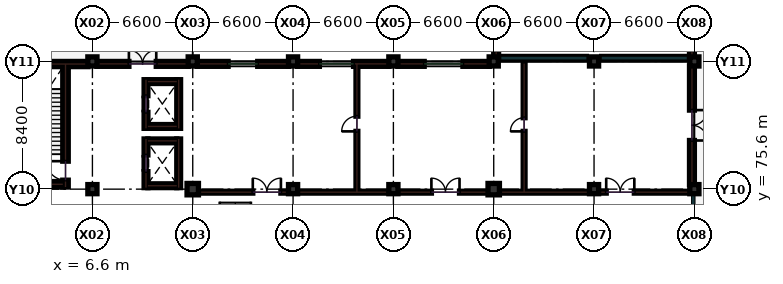
"""IFC4 building model, lengths in metres.
Left out: names, types, materials, properties, quantities, classifications, styles, units other than length and angle.
Written with IfcOpenShell. Run it as: python <this file> out.ifc"""

import sys

from ifc_helpers import new_model, si_unit, direction, frame, frame_2d, origin, origin_2d, place, context, subcontext, project, spatial, rectangle, circle, extrude, element, fill, save


model = new_model("IFC4")
c1 = context("Model", 3, precision=1e-05, world=origin(), true_north=direction((0.0, 1.0)))
c2 = subcontext(c1, "Body", "Model", "MODEL_VIEW")
j1 = project(units=[si_unit("LENGTHUNIT", "METRE"), si_unit("PLANEANGLEUNIT", "RADIAN")], contexts=[c1])
p1 = place(None, origin())
s1 = spatial("IfcSite", under=j1, at=p1, CompositionType="ELEMENT")
p2 = place(p1, origin())
s2 = spatial("IfcBuilding", under=s1, at=p2, CompositionType="ELEMENT")
p3 = place(p2, origin())
s3 = spatial("IfcBuildingStorey", under=s2, at=p3, CompositionType="ELEMENT", Elevation=0.0)
for number, where, z_axis, x_axis in (
    (1, (6.6, 75.6, 0.0), (0.0, 0.0, 1.0), (1.0, 0.0, 0.0)),
    (2, (6.6, 84.0, 0.0), (0.0, 0.0, 1.0), (1.0, 0.0, 0.0)),
):
    element("IfcColumn", number, at=place(p3, frame(where, z_axis=z_axis, x_axis=x_axis)), inside=s3, PredefinedType="COLUMN", context=c2, shape_type="SweptSolid", body=[
        extrude(rectangle(XDim=0.6, YDim=0.6, at=origin_2d()), origin(), (0.0, 0.0, 1.0), 5.4),
    ])
p4 = place(p3, frame((13.2, 75.6, 0.0), z_axis=(0.0, 0.0, 1.0), x_axis=(1.0, 0.0, 0.0)))
e3 = element("IfcColumn", 3, at=p4, inside=s3, PredefinedType="COLUMN", context=c2, shape_type="SweptSolid", body=[
    extrude(circle(Radius=0.375, at=origin_2d()), origin(), (0.0, 0.0, 1.0), 5.4),
])
for number, where, z_axis, x_axis in (
    (4, (13.2, 84.0, 0.0), (0.0, 0.0, 1.0), (1.0, 0.0, 0.0)),
    (5, (19.8, 75.6, 0.0), (0.0, 0.0, 1.0), (1.0, 0.0, 0.0)),
    (6, (19.8, 84.0, 0.0), (0.0, 0.0, 1.0), (1.0, 0.0, 0.0)),
    (7, (26.4, 75.6, 0.0), (0.0, 0.0, 1.0), (1.0, 0.0, 0.0)),
    (8, (26.4, 84.0, 0.0), (0.0, 0.0, 1.0), (1.0, 0.0, 0.0)),
):
    element("IfcColumn", number, at=place(p3, frame(where, z_axis=z_axis, x_axis=x_axis)), inside=s3, PredefinedType="COLUMN", context=c2, shape_type="SweptSolid", body=[
        extrude(rectangle(XDim=0.6, YDim=0.6, at=origin_2d()), origin(), (0.0, 0.0, 1.0), 5.4),
    ])
p5 = place(p3, frame((33.0, 75.6, 0.0), z_axis=(0.0, 0.0, 1.0), x_axis=(1.0, 0.0, 0.0)))
e9 = element("IfcColumn", 9, at=p5, inside=s3, PredefinedType="COLUMN", context=c2, shape_type="SweptSolid", body=[
    extrude(circle(Radius=0.375, at=origin_2d()), origin(), (0.0, 0.0, 1.0), 5.4),
])
for number, where, z_axis, x_axis in (
    (10, (33.0, 84.0, 0.0), (0.0, 0.0, 1.0), (1.0, 0.0, 0.0)),
    (11, (39.6, 75.6, 0.0), (0.0, 0.0, 1.0), (1.0, 0.0, 0.0)),
    (12, (39.6, 84.0, 0.0), (0.0, 0.0, 1.0), (1.0, 0.0, 0.0)),
    (13, (46.2, 75.6, 0.0), (0.0, 0.0, 1.0), (1.0, 0.0, 0.0)),
    (14, (46.2, 84.0, 0.0), (0.0, 0.0, 1.0), (1.0, 0.0, 0.0)),
):
    element("IfcColumn", number, at=place(p3, frame(where, z_axis=z_axis, x_axis=x_axis)), inside=s3, PredefinedType="COLUMN", context=c2, shape_type="SweptSolid", body=[
        extrude(rectangle(XDim=0.6, YDim=0.6, at=origin_2d()), origin(), (0.0, 0.0, 1.0), 5.4),
    ])
p6 = place(p3, frame((12.9, 75.4, 0.0), z_axis=(0.0, 0.0, 1.0), x_axis=(1.0, 0.0, 0.0)))
e15 = element("IfcWall", 15, at=p6, inside=s3, PredefinedType="PARTITIONING", context=c2, shape_type="SweptSolid", body=[
    extrude(rectangle(XDim=6.45, YDim=0.12, at=frame_2d((3.225, 0.0))), origin(), (0.0, 0.0, 1.0), 4.235),
])
p7 = place(p6, frame((4.25, 0.0, 0.0)))
e16 = element("IfcOpeningElement", 16, at=p7, cuts=e15, PredefinedType="OPENING", context=c2, shape_type="SweptSolid", body=[
    extrude(rectangle(XDim=1.85, YDim=2.25, at=frame_2d((0.925, 1.125))), frame((0.0, 0.07, 0.0), z_axis=(0.0, -1.0, 0.0), x_axis=(1.0, 0.0, 0.0)), (0.0, 0.0, 1.0), 0.14),
])
p8 = place(p3, frame((20.25, 75.4, 0.0), z_axis=(0.0, 0.0, 1.0), x_axis=(1.0, 0.0, 0.0)))
e17 = element("IfcWall", 17, at=p8, inside=s3, PredefinedType="PARTITIONING", context=c2, shape_type="SweptSolid", body=[
    extrude(rectangle(XDim=5.7, YDim=0.12, at=frame_2d((2.85, 0.0))), origin(), (0.0, 0.0, 1.0), 4.235),
])
p9 = place(p3, frame((26.85, 75.4, 0.0), z_axis=(0.0, 0.0, 1.0), x_axis=(1.0, 0.0, 0.0)))
e18 = element("IfcWall", 18, at=p9, inside=s3, PredefinedType="PARTITIONING", context=c2, shape_type="SweptSolid", body=[
    extrude(rectangle(XDim=5.7, YDim=0.12, at=frame_2d((2.85, 0.0))), origin(), (0.0, 0.0, 1.0), 4.235),
])
p10 = place(p9, frame((2.05, 0.0, 0.0)))
e19 = element("IfcOpeningElement", 19, at=p10, cuts=e18, PredefinedType="OPENING", context=c2, shape_type="SweptSolid", body=[
    extrude(rectangle(XDim=1.85, YDim=2.25, at=frame_2d((0.925, 1.125))), frame((0.0, 0.07, 0.0), z_axis=(0.0, -1.0, 0.0), x_axis=(1.0, 0.0, 0.0)), (0.0, 0.0, 1.0), 0.14),
])
p11 = place(p3, frame((33.45, 75.4, 0.0), z_axis=(0.0, 0.0, 1.0), x_axis=(1.0, 0.0, 0.0)))
e20 = element("IfcWall", 20, at=p11, inside=s3, PredefinedType="PARTITIONING", context=c2, shape_type="SweptSolid", body=[
    extrude(rectangle(XDim=5.7, YDim=0.12, at=frame_2d((2.85, 0.0))), origin(), (0.0, 0.0, 1.0), 4.235),
])
p12 = place(p3, frame((40.05, 75.4, 0.0), z_axis=(0.0, 0.0, 1.0), x_axis=(1.0, 0.0, 0.0)))
e21 = element("IfcWall", 21, at=p12, inside=s3, PredefinedType="PARTITIONING", context=c2, shape_type="SweptSolid", body=[
    extrude(rectangle(XDim=5.9, YDim=0.12, at=frame_2d((2.95, 0.0))), origin(), (0.0, 0.0, 1.0), 4.235),
])
p13 = place(p12, frame((0.35, 0.0, 0.0)))
e22 = element("IfcOpeningElement", 22, at=p13, cuts=e21, PredefinedType="OPENING", context=c2, shape_type="SweptSolid", body=[
    extrude(rectangle(XDim=1.85, YDim=2.25, at=frame_2d((0.925, 1.125))), frame((0.0, 0.07, 0.0), z_axis=(0.0, -1.0, 0.0), x_axis=(1.0, 0.0, 0.0)), (0.0, 0.0, 1.0), 0.14),
])
p14 = place(p3, frame((24.0, 75.4, 0.0), z_axis=(0.0, 0.0, 1.0), x_axis=(0.0, 1.0, 0.0)))
e23 = element("IfcWall", 23, at=p14, inside=s3, PredefinedType="PARTITIONING", context=c2, shape_type="SweptSolid", body=[
    extrude(rectangle(XDim=8.46, YDim=0.12, at=frame_2d((4.23, 0.0))), origin(), (0.0, 0.0, 1.0), 4.25),
])
p15 = place(p14, frame((4.0, 0.0, 0.0)))
e24 = element("IfcOpeningElement", 24, at=p15, cuts=e23, PredefinedType="OPENING", context=c2, shape_type="SweptSolid", body=[
    extrude(rectangle(XDim=1.0, YDim=2.2, at=frame_2d((0.5, 1.1))), frame((0.0, 0.07, 0.0), z_axis=(0.0, -1.0, 0.0), x_axis=(1.0, 0.0, 0.0)), (0.0, 0.0, 1.0), 0.14),
])
p16 = place(p3, frame((35.0, 75.4, 0.0), z_axis=(0.0, 0.0, 1.0), x_axis=(0.0, 1.0, 0.0)))
e25 = element("IfcWall", 25, at=p16, inside=s3, PredefinedType="PARTITIONING", context=c2, shape_type="SweptSolid", body=[
    extrude(rectangle(XDim=8.46, YDim=0.12, at=frame_2d((4.23, 0.0))), origin(), (0.0, 0.0, 1.0), 4.25),
])
p17 = place(p16, frame((4.0, 0.0, 0.0)))
e26 = element("IfcOpeningElement", 26, at=p17, cuts=e25, PredefinedType="OPENING", context=c2, shape_type="SweptSolid", body=[
    extrude(rectangle(XDim=0.9, YDim=2.1, at=frame_2d((0.45, 1.05))), frame((0.0, 0.07, 0.0), z_axis=(0.0, -1.0, 0.0), x_axis=(1.0, 0.0, 0.0)), (0.0, 0.0, 1.0), 0.14),
])
p18 = place(p3, frame((6.305, 83.83, 0.0), z_axis=(0.0, 0.0, 1.0), x_axis=(-1.0, 0.0, 0.0)))
e27 = element("IfcWall", 27, at=p18, inside=s3, PredefinedType="SHEAR", context=c2, shape_type="SweptSolid", body=[
    extrude(rectangle(XDim=6.01, YDim=0.34, at=frame_2d((3.005, 0.0))), origin(), (0.0, 0.0, 1.0), 5.1),
])
p19 = place(p3, frame((12.905, 83.84, 0.0), z_axis=(0.0, 0.0, 1.0), x_axis=(-1.0, 0.0, 0.0)))
e28 = element("IfcWall", 28, at=p19, inside=s3, PredefinedType="SOLIDWALL", context=c2, shape_type="SweptSolid", body=[
    extrude(rectangle(XDim=6.01, YDim=0.32, at=frame_2d((3.005, 0.0))), origin(), (0.0, 0.0, 1.0), 4.385),
])
p20 = place(p19, frame((2.105, 0.0, 0.0)))
e29 = element("IfcOpeningElement", 29, at=p20, cuts=e28, PredefinedType="OPENING", context=c2, shape_type="SweptSolid", body=[
    extrude(rectangle(XDim=1.8, YDim=2.2, at=frame_2d((0.9, 1.1))), frame((0.0, 0.17, 0.0), z_axis=(0.0, -1.0, 0.0), x_axis=(1.0, 0.0, 0.0)), (0.0, 0.0, 1.0), 0.34),
])
p21 = place(p3, frame((19.505, 83.84, 0.0), z_axis=(0.0, 0.0, 1.0), x_axis=(-1.0, 0.0, 0.0)))
e30 = element("IfcWall", 30, at=p21, inside=s3, PredefinedType="SOLIDWALL", context=c2, shape_type="SweptSolid", body=[
    extrude(rectangle(XDim=6.01, YDim=0.32, at=frame_2d((3.005, 0.0))), origin(), (0.0, 0.0, 1.0), 4.385),
])
p22 = place(p21, frame((2.03, 0.0, 0.95)))
e31 = element("IfcOpeningElement", 31, at=p22, cuts=e30, PredefinedType="OPENING", context=c2, shape_type="SweptSolid", body=[
    extrude(rectangle(XDim=1.95, YDim=1.55, at=frame_2d((0.975, 0.775))), frame((0.0, 0.17, 0.0), z_axis=(0.0, -1.0, 0.0), x_axis=(1.0, 0.0, 0.0)), (0.0, 0.0, 1.0), 0.34),
])
p23 = place(p3, frame((26.105, 83.84, 0.0), z_axis=(0.0, 0.0, 1.0), x_axis=(-1.0, 0.0, 0.0)))
e32 = element("IfcWall", 32, at=p23, inside=s3, PredefinedType="SOLIDWALL", context=c2, shape_type="SweptSolid", body=[
    extrude(rectangle(XDim=6.01, YDim=0.32, at=frame_2d((3.005, 0.0))), origin(), (0.0, 0.0, 1.0), 4.385),
])
p24 = place(p23, frame((2.325, 0.0, 0.95)))
e33 = element("IfcOpeningElement", 33, at=p24, cuts=e32, PredefinedType="OPENING", context=c2, shape_type="SweptSolid", body=[
    extrude(rectangle(XDim=2.25, YDim=1.55, at=frame_2d((1.125, 0.775))), frame((0.0, 0.17, 0.0), z_axis=(0.0, -1.0, 0.0), x_axis=(1.0, 0.0, 0.0)), (0.0, 0.0, 1.0), 0.34),
])
p25 = place(p3, frame((32.705, 83.84, 0.0), z_axis=(0.0, 0.0, 1.0), x_axis=(-1.0, 0.0, 0.0)))
e34 = element("IfcWall", 34, at=p25, inside=s3, PredefinedType="SOLIDWALL", context=c2, shape_type="SweptSolid", body=[
    extrude(rectangle(XDim=6.01, YDim=0.32, at=frame_2d((3.005, 0.0))), origin(), (0.0, 0.0, 1.0), 4.385),
])
p26 = place(p25, frame((1.73, 0.0, 0.95)))
e35 = element("IfcOpeningElement", 35, at=p26, cuts=e34, PredefinedType="OPENING", context=c2, shape_type="SweptSolid", body=[
    extrude(rectangle(XDim=2.55, YDim=1.65, at=frame_2d((1.275, 0.825))), frame((0.0, 0.17, 0.0), z_axis=(0.0, -1.0, 0.0), x_axis=(1.0, 0.0, 0.0)), (0.0, 0.0, 1.0), 0.34),
])
p27 = place(p3, frame((33.16, 92.105, 0.0), z_axis=(0.0, 0.0, 1.0), x_axis=(0.0, -1.0, 0.0)))
e36 = element("IfcWall", 36, at=p27, inside=s3, PredefinedType="SOLIDWALL", context=c2, shape_type="SweptSolid", body=[
    extrude(rectangle(XDim=7.81, YDim=0.32, at=frame_2d((3.905, 0.0))), origin(), (0.0, 0.0, 1.0), 4.335),
])
p28 = place(p27, frame((3.005, 0.0, 0.95)))
e37 = element("IfcOpeningElement", 37, at=p28, cuts=e36, PredefinedType="OPENING", context=c2, shape_type="SweptSolid", body=[
    extrude(rectangle(XDim=1.8, YDim=1.6, at=frame_2d((0.9, 0.8))), frame((0.0, 0.17, 0.0), z_axis=(0.0, -1.0, 0.0), x_axis=(1.0, 0.0, 0.0)), (0.0, 0.0, 1.0), 0.34),
])
p29 = place(p3, frame((46.04, 75.895, 0.0), z_axis=(0.0, 0.0, 1.0), x_axis=(0.0, 1.0, 0.0)))
e38 = element("IfcWall", 38, at=p29, inside=s3, PredefinedType="SOLIDWALL", context=c2, shape_type="SweptSolid", body=[
    extrude(rectangle(XDim=7.81, YDim=0.32, at=frame_2d((3.905, 0.0))), origin(), (0.0, 0.0, 1.0), 4.335),
])
p30 = place(p29, frame((2.905, 0.0, 0.0)))
e39 = element("IfcOpeningElement", 39, at=p30, cuts=e38, PredefinedType="OPENING", context=c2, shape_type="SweptSolid", body=[
    extrude(rectangle(XDim=2.0, YDim=2.4, at=frame_2d((1.0, 1.2))), frame((0.0, 0.17, 0.0), z_axis=(0.0, -1.0, 0.0), x_axis=(1.0, 0.0, 0.0)), (0.0, 0.0, 1.0), 0.34),
])
p31 = place(p3, frame((46.04, 84.295, 0.0), z_axis=(0.0, 0.0, 1.0), x_axis=(0.0, 1.0, 0.0)))
e40 = element("IfcWall", 40, at=p31, inside=s3, PredefinedType="SOLIDWALL", context=c2, shape_type="SweptSolid", body=[
    extrude(rectangle(XDim=7.81, YDim=0.32, at=frame_2d((3.905, 0.0))), origin(), (0.0, 0.0, 1.0), 4.335),
])
p32 = place(p31, frame((3.005, 0.0, 0.95)))
e41 = element("IfcOpeningElement", 41, at=p32, cuts=e40, PredefinedType="OPENING", context=c2, shape_type="SweptSolid", body=[
    extrude(rectangle(XDim=1.8, YDim=1.6, at=frame_2d((0.9, 0.8))), frame((0.0, 0.17, 0.0), z_axis=(0.0, -1.0, 0.0), x_axis=(1.0, 0.0, 0.0)), (0.0, 0.0, 1.0), 0.34),
])
p33 = place(p3, frame((33.5, 84.22, 0.0), z_axis=(0.0, 0.0, 1.0), x_axis=(1.0, 0.0, 0.0)))
e42 = element("IfcWall", 42, at=p33, inside=s3, PredefinedType="SOLIDWALL", context=c2, shape_type="SweptSolid", body=[
    extrude(rectangle(XDim=5.6, YDim=0.22, at=frame_2d((2.8, 0.0))), origin(), (0.0, 0.0, 1.0), 0.85),
])
p34 = place(p3, frame((40.1, 84.22, 0.0), z_axis=(0.0, 0.0, 1.0), x_axis=(1.0, 0.0, 0.0)))
e43 = element("IfcWall", 43, at=p34, inside=s3, PredefinedType="SOLIDWALL", context=c2, shape_type="SweptSolid", body=[
    extrude(rectangle(XDim=5.6, YDim=0.22, at=frame_2d((2.8, 0.0))), origin(), (0.0, 0.0, 1.0), 0.85),
])
p35 = place(p3, frame((4.83, 75.74, 0.0), z_axis=(0.0, 0.0, 1.0), x_axis=(0.0, 1.0, 0.0)))
e44 = element("IfcWall", 44, at=p35, inside=s3, PredefinedType="SHEAR", context=c2, shape_type="SweptSolid", body=[
    extrude(rectangle(XDim=8.09, YDim=0.36, at=frame_2d((4.045, 0.0))), origin(), (0.0, 0.0, 1.0), 5.1),
])
p36 = place(p35, frame((0.45, 0.0, 0.0)))
e45 = element("IfcOpeningElement", 45, at=p36, cuts=e44, PredefinedType="OPENING", context=c2, shape_type="SweptSolid", body=[
    extrude(rectangle(XDim=1.25, YDim=2.15, at=frame_2d((0.625, 1.075))), frame((0.0, 0.19, 0.0), z_axis=(0.0, -1.0, 0.0), x_axis=(1.0, 0.0, 0.0)), (0.0, 0.0, 1.0), 0.38),
])
p37 = place(p3, frame((0.85, 75.92, 0.0), z_axis=(0.0, 0.0, 1.0), x_axis=(1.0, 0.0, 0.0)))
e46 = element("IfcWall", 46, at=p37, inside=s3, PredefinedType="SHEAR", context=c2, shape_type="SweptSolid", body=[
    extrude(rectangle(XDim=3.8, YDim=0.36, at=frame_2d((1.9, 0.0))), origin(), (0.0, 0.0, 1.0), 5.1),
])
p38 = place(p3, frame((10.125, 75.7, 0.0), z_axis=(0.0, 0.0, 1.0), x_axis=(0.0, 1.0, 0.0)))
e47 = element("IfcWall", 47, at=p38, inside=s3, PredefinedType="SHEAR", context=c2, shape_type="SweptSolid", body=[
    extrude(rectangle(XDim=3.2, YDim=0.25, at=frame_2d((1.6, 0.0))), origin(), (0.0, 0.0, 1.0), 5.1),
])
p39 = place(p38, frame((1.05, 0.0, 0.0)))
e48 = element("IfcOpeningElement", 48, at=p39, cuts=e47, PredefinedType="OPENING", context=c2, shape_type="SweptSolid", body=[
    extrude(rectangle(XDim=1.1, YDim=2.15, at=frame_2d((0.55, 1.075))), frame((0.0, 0.135, 0.0), z_axis=(0.0, -1.0, 0.0), x_axis=(1.0, 0.0, 0.0)), (0.0, 0.0, 1.0), 0.27),
])
p40 = place(p3, frame((12.275, 75.7, 0.0), z_axis=(0.0, 0.0, 1.0), x_axis=(0.0, 1.0, 0.0)))
e49 = element("IfcWall", 49, at=p40, inside=s3, PredefinedType="SHEAR", context=c2, shape_type="SweptSolid", body=[
    extrude(rectangle(XDim=3.2, YDim=0.25, at=frame_2d((1.6, 0.0))), origin(), (0.0, 0.0, 1.0), 5.1),
])
for number, where, z_axis, x_axis in (
    (50, (10.25, 75.825, 0.0), (0.0, 0.0, 1.0), (1.0, 0.0, 0.0)),
    (51, (10.25, 78.775, 0.0), (0.0, 0.0, 1.0), (1.0, 0.0, 0.0)),
):
    element("IfcWall", number, at=place(p3, frame(where, z_axis=z_axis, x_axis=x_axis)), inside=s3, PredefinedType="SHEAR", context=c2, shape_type="SweptSolid", body=[
        extrude(rectangle(XDim=1.9, YDim=0.25, at=frame_2d((0.95, 0.0))), origin(), (0.0, 0.0, 1.0), 5.1),
    ])
p41 = place(p3, frame((10.125, 79.6, 0.0), z_axis=(0.0, 0.0, 1.0), x_axis=(0.0, 1.0, 0.0)))
e52 = element("IfcWall", 52, at=p41, inside=s3, PredefinedType="SHEAR", context=c2, shape_type="SweptSolid", body=[
    extrude(rectangle(XDim=3.2, YDim=0.25, at=frame_2d((1.6, 0.0))), origin(), (0.0, 0.0, 1.0), 5.1),
])
p42 = place(p41, frame((1.05, 0.0, 0.0)))
e53 = element("IfcOpeningElement", 53, at=p42, cuts=e52, PredefinedType="OPENING", context=c2, shape_type="SweptSolid", body=[
    extrude(rectangle(XDim=1.1, YDim=2.15, at=frame_2d((0.55, 1.075))), frame((0.0, 0.135, 0.0), z_axis=(0.0, -1.0, 0.0), x_axis=(1.0, 0.0, 0.0)), (0.0, 0.0, 1.0), 0.27),
])
p43 = place(p3, frame((12.275, 79.6, 0.0), z_axis=(0.0, 0.0, 1.0), x_axis=(0.0, 1.0, 0.0)))
e54 = element("IfcWall", 54, at=p43, inside=s3, PredefinedType="SHEAR", context=c2, shape_type="SweptSolid", body=[
    extrude(rectangle(XDim=3.2, YDim=0.25, at=frame_2d((1.6, 0.0))), origin(), (0.0, 0.0, 1.0), 5.1),
])
for number, where, z_axis, x_axis in (
    (55, (10.25, 79.725, 0.0), (0.0, 0.0, 1.0), (1.0, 0.0, 0.0)),
    (56, (10.25, 82.675, 0.0), (0.0, 0.0, 1.0), (1.0, 0.0, 0.0)),
):
    element("IfcWall", number, at=place(p3, frame(where, z_axis=z_axis, x_axis=x_axis)), inside=s3, PredefinedType="SHEAR", context=c2, shape_type="SweptSolid", body=[
        extrude(rectangle(XDim=1.9, YDim=0.25, at=frame_2d((0.95, 0.0))), origin(), (0.0, 0.0, 1.0), 5.1),
    ])
p44 = place(p7, origin())
e57 = element("IfcDoor", 57, at=p44, inside=s3, OperationType="DOUBLE_DOOR_SINGLE_SWING", PredefinedType="DOOR", context=c2, shape_type="SweptSolid", body=[
    extrude(rectangle(XDim=1.85, YDim=2.25, at=frame_2d((0.925, 1.125))), frame((0.0, 0.025, 0.0), z_axis=(0.0, -1.0, 0.0), x_axis=(1.0, 0.0, 0.0)), (0.0, 0.0, 1.0), 0.05),
])
fill(e16, e57)
p45 = place(p10, origin())
e58 = element("IfcDoor", 58, at=p45, inside=s3, OperationType="DOUBLE_DOOR_SINGLE_SWING", PredefinedType="DOOR", context=c2, shape_type="SweptSolid", body=[
    extrude(rectangle(XDim=1.85, YDim=2.25, at=frame_2d((0.925, 1.125))), frame((0.0, 0.025, 0.0), z_axis=(0.0, -1.0, 0.0), x_axis=(1.0, 0.0, 0.0)), (0.0, 0.0, 1.0), 0.05),
])
fill(e19, e58)
p46 = place(p13, origin())
e59 = element("IfcDoor", 59, at=p46, inside=s3, OperationType="DOUBLE_DOOR_SINGLE_SWING", PredefinedType="DOOR", context=c2, shape_type="SweptSolid", body=[
    extrude(rectangle(XDim=1.85, YDim=2.25, at=frame_2d((0.925, 1.125))), frame((0.0, 0.025, 0.0), z_axis=(0.0, -1.0, 0.0), x_axis=(1.0, 0.0, 0.0)), (0.0, 0.0, 1.0), 0.05),
])
fill(e22, e59)
p47 = place(p15, origin())
e60 = element("IfcDoor", 60, at=p47, inside=s3, OperationType="SINGLE_SWING_LEFT", PredefinedType="DOOR", context=c2, shape_type="SweptSolid", body=[
    extrude(rectangle(XDim=1.0, YDim=2.2, at=frame_2d((0.5, 1.1))), frame((0.0, 0.025, 0.0), z_axis=(0.0, -1.0, 0.0), x_axis=(1.0, 0.0, 0.0)), (0.0, 0.0, 1.0), 0.05),
])
fill(e24, e60)
p48 = place(p17, origin())
e61 = element("IfcDoor", 61, at=p48, inside=s3, OperationType="SINGLE_SWING_LEFT", PredefinedType="DOOR", context=c2, shape_type="SweptSolid", body=[
    extrude(rectangle(XDim=0.9, YDim=2.1, at=frame_2d((0.45, 1.05))), frame((0.0, 0.025, 0.0), z_axis=(0.0, -1.0, 0.0), x_axis=(1.0, 0.0, 0.0)), (0.0, 0.0, 1.0), 0.05),
])
fill(e26, e61)
p49 = place(p20, frame((1.8, 0.0, 0.0), z_axis=(0.0, 0.0, 1.0), x_axis=(-1.0, 0.0, 0.0)))
e62 = element("IfcDoor", 62, at=p49, inside=s3, OperationType="DOUBLE_DOOR_SINGLE_SWING", PredefinedType="DOOR", context=c2, shape_type="SweptSolid", body=[
    extrude(rectangle(XDim=1.8, YDim=2.2, at=frame_2d((0.9, 1.1))), frame((0.0, 0.025, 0.0), z_axis=(0.0, -1.0, 0.0), x_axis=(1.0, 0.0, 0.0)), (0.0, 0.0, 1.0), 0.05),
])
fill(e29, e62)
p50 = place(p22, origin())
e63 = element("IfcWindow", 63, at=p50, inside=s3, PartitioningType="SINGLE_PANEL", PredefinedType="WINDOW", context=c2, shape_type="SweptSolid", body=[
    extrude(rectangle(XDim=1.95, YDim=1.55, at=frame_2d((0.975, 0.775))), frame((0.0, 0.03, 0.0), z_axis=(0.0, -1.0, 0.0), x_axis=(1.0, 0.0, 0.0)), (0.0, 0.0, 1.0), 0.06),
])
fill(e31, e63)
p51 = place(p24, origin())
e64 = element("IfcWindow", 64, at=p51, inside=s3, PartitioningType="SINGLE_PANEL", PredefinedType="WINDOW", context=c2, shape_type="SweptSolid", body=[
    extrude(rectangle(XDim=2.25, YDim=1.55, at=frame_2d((1.125, 0.775))), frame((0.0, 0.03, 0.0), z_axis=(0.0, -1.0, 0.0), x_axis=(1.0, 0.0, 0.0)), (0.0, 0.0, 1.0), 0.06),
])
fill(e33, e64)
p52 = place(p26, origin())
e65 = element("IfcWindow", 65, at=p52, inside=s3, PartitioningType="SINGLE_PANEL", PredefinedType="WINDOW", context=c2, shape_type="SweptSolid", body=[
    extrude(rectangle(XDim=2.55, YDim=1.65, at=frame_2d((1.275, 0.825))), frame((0.0, 0.03, 0.0), z_axis=(0.0, -1.0, 0.0), x_axis=(1.0, 0.0, 0.0)), (0.0, 0.0, 1.0), 0.06),
])
fill(e35, e65)
p53 = place(p30, frame((2.0, 0.0, 0.0), z_axis=(0.0, 0.0, 1.0), x_axis=(-1.0, 0.0, 0.0)))
e66 = element("IfcDoor", 66, at=p53, inside=s3, OperationType="DOUBLE_DOOR_SINGLE_SWING", PredefinedType="DOOR", context=c2, shape_type="SweptSolid", body=[
    extrude(rectangle(XDim=2.0, YDim=2.4, at=frame_2d((1.0, 1.2))), frame((0.0, 0.025, 0.0), z_axis=(0.0, -1.0, 0.0), x_axis=(1.0, 0.0, 0.0)), (0.0, 0.0, 1.0), 0.05),
])
fill(e39, e66)
p54 = place(p36, origin())
e67 = element("IfcDoor", 67, at=p54, inside=s3, OperationType="SINGLE_SWING_RIGHT", PredefinedType="DOOR", context=c2, shape_type="SweptSolid", body=[
    extrude(rectangle(XDim=1.25, YDim=2.15, at=frame_2d((0.625, 1.075))), frame((0.0, 0.025, 0.0), z_axis=(0.0, -1.0, 0.0), x_axis=(1.0, 0.0, 0.0)), (0.0, 0.0, 1.0), 0.05),
])
fill(e45, e67)
p55 = place(p39, origin())
e68 = element("IfcDoor", 68, at=p55, inside=s3, OperationType="SLIDING_TO_LEFT", PredefinedType="DOOR", context=c2, shape_type="SweptSolid", body=[
    extrude(rectangle(XDim=1.1, YDim=2.15, at=frame_2d((0.55, 1.075))), frame((0.0, 0.025, 0.0), z_axis=(0.0, -1.0, 0.0), x_axis=(1.0, 0.0, 0.0)), (0.0, 0.0, 1.0), 0.05),
])
fill(e48, e68)
p56 = place(p42, origin())
e69 = element("IfcDoor", 69, at=p56, inside=s3, OperationType="SLIDING_TO_LEFT", PredefinedType="DOOR", context=c2, shape_type="SweptSolid", body=[
    extrude(rectangle(XDim=1.1, YDim=2.15, at=frame_2d((0.55, 1.075))), frame((0.0, 0.025, 0.0), z_axis=(0.0, -1.0, 0.0), x_axis=(1.0, 0.0, 0.0)), (0.0, 0.0, 1.0), 0.05),
])
fill(e53, e69)
save(model, sys.argv[1])
